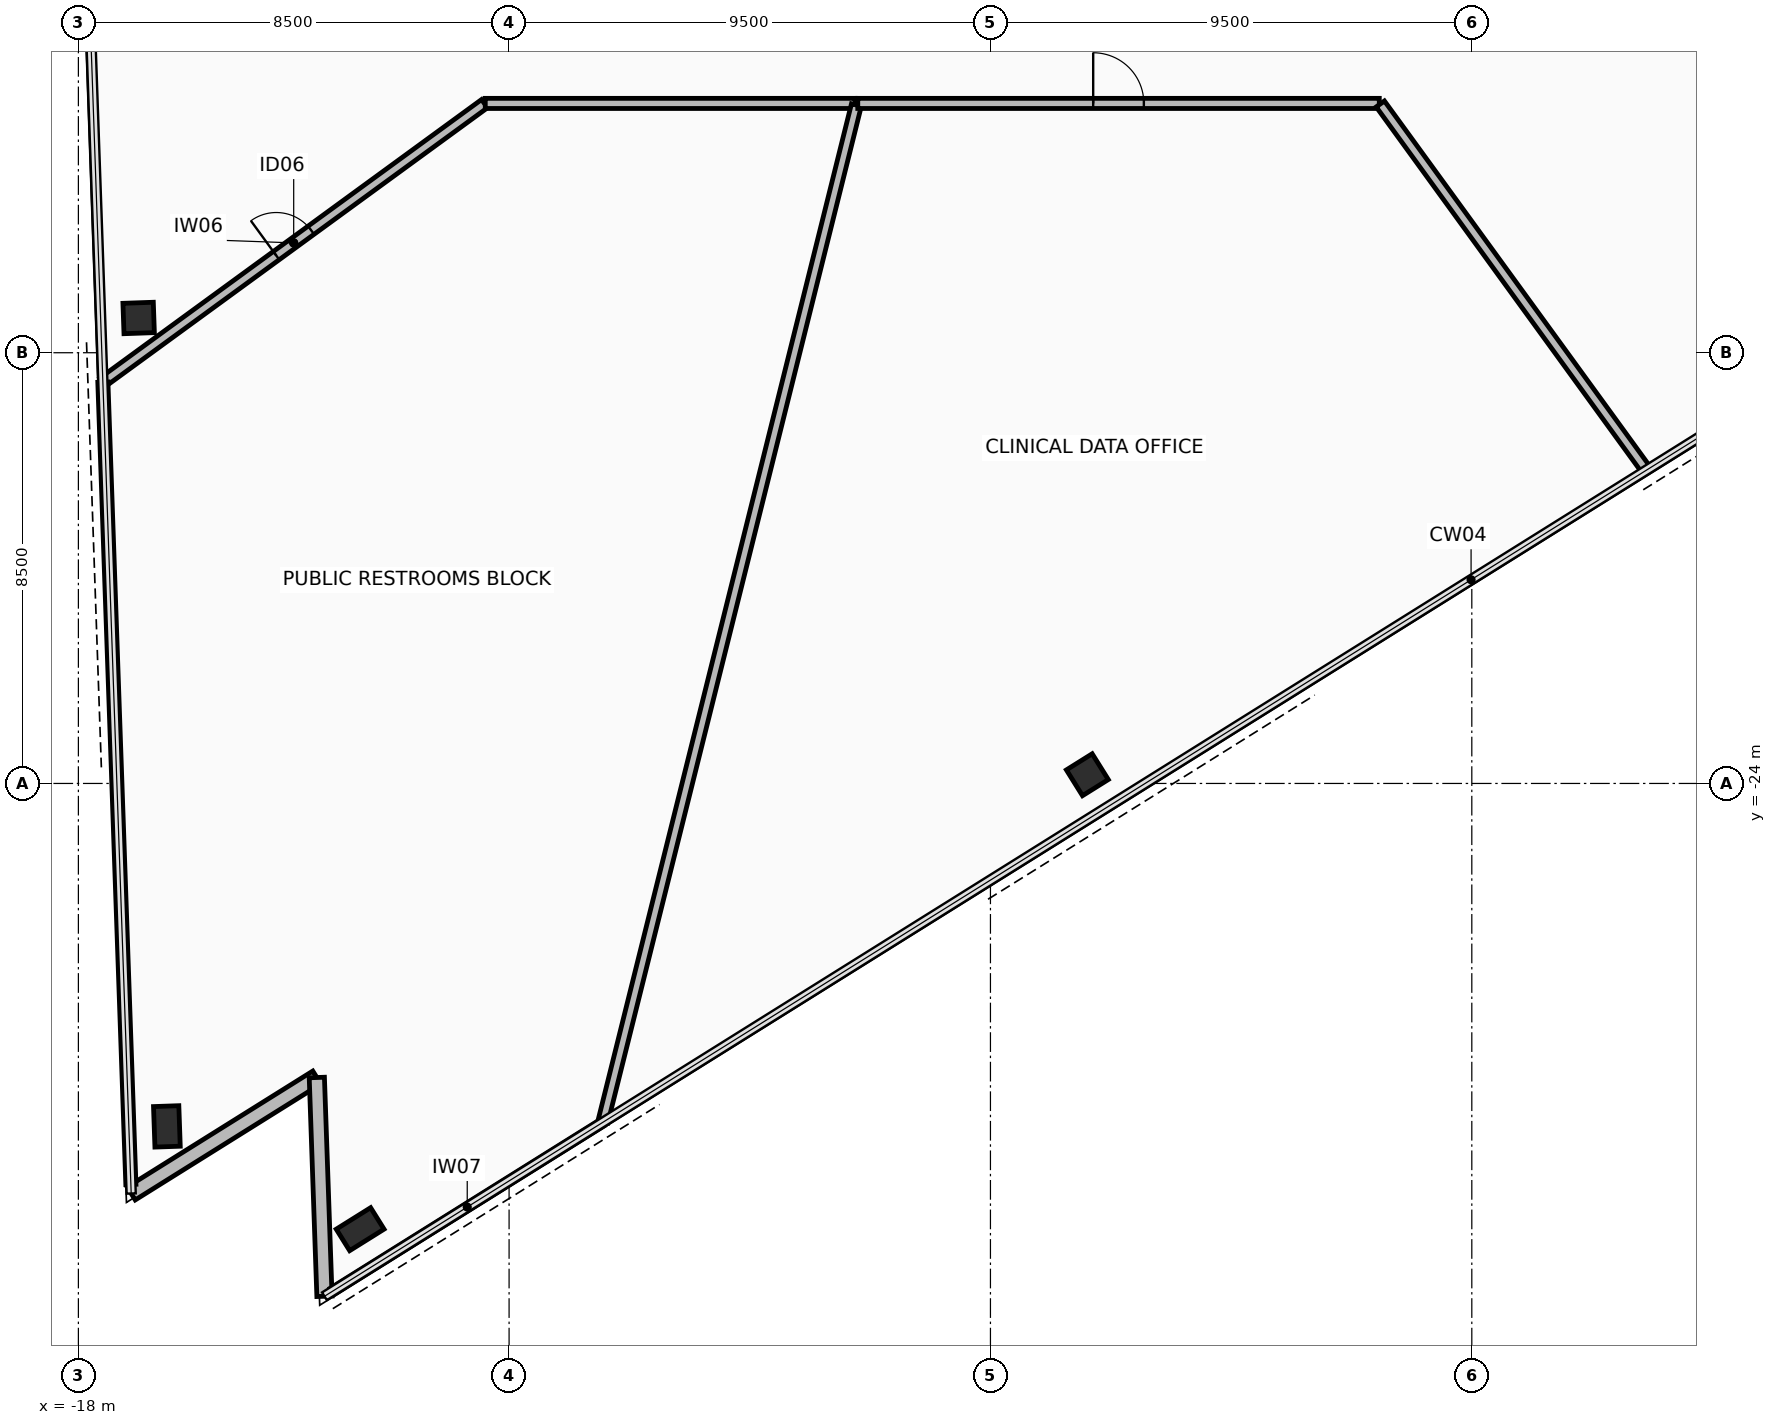
"""IFC4 building model, lengths in metres.
Left out: names, types, materials, properties, quantities, classifications, styles, units other than length and angle.
Written with IfcOpenShell. Run it as: python <this file> out.ifc"""

import sys

from ifc_helpers import new_model, si_unit, direction, frame, frame_2d, origin, origin_2d, place, context, subcontext, project, spatial, rectangle, hollow_rectangle, extrude, element, fill, save


model = new_model("IFC4")
c1 = context("Model", 3, precision=1e-05, world=origin(), true_north=direction((0.0, 1.0)))
c2 = subcontext(c1, "Body", "Model", "MODEL_VIEW")
j1 = project(units=[si_unit("LENGTHUNIT", "METRE"), si_unit("PLANEANGLEUNIT", "RADIAN")], contexts=[c1])
p1 = place(None, origin())
s1 = spatial("IfcSite", under=j1, at=p1, CompositionType="ELEMENT")
p2 = place(p1, origin())
s2 = spatial("IfcBuilding", under=s1, at=p2, CompositionType="ELEMENT")
p3 = place(p2, frame((0.0, 0.0, 142.4)))
s3 = spatial("IfcBuildingStorey", under=s2, at=p3, CompositionType="ELEMENT", Elevation=142.4)
p4 = place(p3, frame((-16.811, -14.814, 0.0), z_axis=(0.0, 0.0, 1.0), x_axis=(-0.034899496703, 0.999390827019, 0.0)))
e1 = element("IfcColumn", 1, at=p4, inside=s3, PredefinedType="COLUMN", context=c2, shape_type="SweptSolid", body=[
    extrude(hollow_rectangle(XDim=0.6, YDim=0.6, WallThickness=0.036, at=origin_2d()), origin(), (0.0, 0.0, 1.0), 3.6),
])
for number, where, z_axis, x_axis in (
    (2, (-16.254, -30.768, 0.0), (0.0, 0.0, 1.0), (-0.035, 0.999, 0.0)),
    (3, (-12.439, -32.796, 0.0), (0.0, 0.0, 1.0), (0.848, 0.53, 0.0)),
):
    element("IfcColumn", number, at=place(p3, frame(where, z_axis=z_axis, x_axis=x_axis)), inside=s3, PredefinedType="COLUMN", context=c2, shape_type="SweptSolid", body=[
        extrude(hollow_rectangle(XDim=0.5, YDim=0.8, WallThickness=0.04, at=origin_2d()), origin(), (0.0, 0.0, 1.0), 3.6),
    ])
p5 = place(p3, frame((1.912, -23.828, 0.0), z_axis=(0.0, 0.0, 1.0), x_axis=(0.848047171272, 0.529920744356, 0.0)))
e4 = element("IfcColumn", 4, at=p5, inside=s3, PredefinedType="COLUMN", context=c2, shape_type="SweptSolid", body=[
    extrude(hollow_rectangle(XDim=0.6, YDim=0.6, WallThickness=0.036, at=origin_2d()), origin(), (0.0, 0.0, 1.0), 3.6),
])
p6 = place(p3, frame((-16.958, -32.092, 0.0), z_axis=(0.0, 0.0, 1.0), x_axis=(0.848068146975, 0.529887174866, 0.0)))
e5 = element("IfcWall", 5, at=p6, inside=s3, PredefinedType="STANDARD", context=c2, shape_type="SweptSolid", body=[
    extrude(rectangle(XDim=4.32, YDim=0.3, at=frame_2d((2.16, 0.0))), origin(), (0.0, 0.0, 1.0), 2.705),
])
p7 = place(p3, frame((-13.294, -29.803, 0.0), z_axis=(0.0, 0.0, 1.0), x_axis=(0.034869079132, -0.999391888761, 0.0)))
e6 = element("IfcWall", 6, at=p7, inside=s3, PredefinedType="STANDARD", context=c2, shape_type="SweptSolid", body=[
    extrude(rectangle(XDim=4.32, YDim=0.3, at=frame_2d((2.16, 0.0))), origin(), (0.0, 0.0, 1.0), 2.705),
])
p8 = place(p3, frame((-17.517, -16.08, 0.0), z_axis=(0.0, 0.0, 1.0), x_axis=(0.807836100195, 0.58940718966, 0.0)))
e7 = element("IfcWall", 7, at=p8, inside=s3, PredefinedType="PARTITIONING", context=c2, shape_type="SweptSolid", body=[
    extrude(rectangle(XDim=9.324, YDim=0.2, at=frame_2d((4.662, 0.0))), origin(), (0.0, 0.0, 1.0), 2.705),
])
p9 = place(p8, frame((4.237, 0.0, 0.0)))
e8 = element("IfcOpeningElement", 8, at=p9, cuts=e7, PredefinedType="OPENING", context=c2, shape_type="SweptSolid", body=[
    extrude(rectangle(XDim=0.85, YDim=2.1, at=frame_2d((0.425, 1.05))), frame((0.0, 0.11, 0.0), z_axis=(0.0, -1.0, 0.0), x_axis=(1.0, 0.0, 0.0)), (0.0, 0.0, 1.0), 0.22),
])
p10 = place(p3, frame((-9.97, -10.58, 0.0), z_axis=(0.0, 0.0, 1.0), x_axis=(1.0, 0.0, 0.0)))
e9 = element("IfcWall", 9, at=p10, inside=s3, PredefinedType="PARTITIONING", context=c2, shape_type="SweptSolid", body=[
    extrude(rectangle(XDim=7.3, YDim=0.2, at=frame_2d((3.65, 0.0))), origin(), (0.0, 0.0, 1.0), 2.855),
])
p11 = place(p3, frame((-2.646, -10.611, 0.0), z_axis=(0.0, 0.0, 1.0), x_axis=(-0.241932855274, -0.970292993656, 0.0)))
e10 = element("IfcWall", 10, at=p11, inside=s3, PredefinedType="PARTITIONING", context=c2, shape_type="SweptSolid", body=[
    extrude(rectangle(XDim=20.682, YDim=0.2, at=frame_2d((10.341, 0.0))), origin(), (0.0, 0.0, 1.0), 2.705),
])
p12 = place(p3, frame((-7.66, -30.694, 0.0), z_axis=(0.0, 0.0, 1.0), x_axis=(-0.848046297007, -0.529922143463, 0.0)))
e11 = element("IfcWall", 11, at=p12, inside=s3, PredefinedType="PARTITIONING", context=c2, shape_type="SweptSolid", body=[
    extrude(rectangle(XDim=6.287, YDim=0.15, at=frame_2d((3.144, 0.0))), origin(), (0.0, 0.0, 1.0), 3.41),
])
p13 = place(p3, frame((-16.964, -31.913, 0.0), z_axis=(0.0, 0.0, 1.0), x_axis=(-0.034889540938, 0.999391174632, 0.0)))
e12 = element("IfcWall", 12, at=p13, inside=s3, PredefinedType="PARTITIONING", context=c2, shape_type="SweptSolid", body=[
    extrude(rectangle(XDim=15.843, YDim=0.2, at=frame_2d((7.921, 0.0))), origin(), (0.0, 0.0, 1.0), 3.41),
])
p14 = place(p3, frame((20.03, -13.391, 0.0), z_axis=(0.0, 0.0, 1.0), x_axis=(-0.782379652936, 0.622801797261, 0.0)))
e13 = element("IfcWall", 13, at=p14, inside=s3, PredefinedType="PARTITIONING", context=c2, shape_type="SweptSolid", body=[
    extrude(rectangle(XDim=10.405, YDim=0.2, at=frame_2d((5.203, 0.0))), origin(), (0.0, 0.0, 1.0), 2.705),
])
p15 = place(p14, frame((4.777, 0.0, 0.0)))
e14 = element("IfcOpeningElement", 14, at=p15, cuts=e13, PredefinedType="OPENING", context=c2, shape_type="SweptSolid", body=[
    extrude(rectangle(XDim=0.85, YDim=2.1, at=frame_2d((0.425, 1.05))), frame((0.0, 0.11, 0.0), z_axis=(0.0, -1.0, 0.0), x_axis=(1.0, 0.0, 0.0)), (0.0, 0.0, 1.0), 0.22),
])
p16 = place(p3, frame((-2.618, -10.58, 0.0), z_axis=(0.0, 0.0, 1.0), x_axis=(1.0, 0.0, 0.0)))
e15 = element("IfcWall", 15, at=p16, inside=s3, PredefinedType="PARTITIONING", context=c2, shape_type="SweptSolid", body=[
    extrude(rectangle(XDim=10.292, YDim=0.2, at=frame_2d((5.146, 0.0))), origin(), (0.0, 0.0, 1.0), 2.855),
])
p17 = place(p16, frame((4.646, 0.0, 0.0)))
e16 = element("IfcOpeningElement", 16, at=p17, cuts=e15, PredefinedType="OPENING", context=c2, shape_type="SweptSolid", body=[
    extrude(rectangle(XDim=1.0, YDim=2.15, at=frame_2d((0.5, 1.075))), frame((0.0, 0.11, 0.0), z_axis=(0.0, -1.0, 0.0), x_axis=(1.0, 0.0, 0.0)), (0.0, 0.0, 1.0), 0.22),
])
p18 = place(p3, frame((7.694, -10.59, 0.0), z_axis=(0.0, 0.0, 1.0), x_axis=(0.587773963439, -0.809025196086, 0.0)))
e17 = element("IfcWall", 17, at=p18, inside=s3, PredefinedType="PARTITIONING", context=c2, shape_type="SweptSolid", body=[
    extrude(rectangle(XDim=8.907, YDim=0.2, at=frame_2d((4.454, 0.0))), origin(), (0.0, 0.0, 1.0), 2.705),
])
p19 = place(p9, origin())
e18 = element("IfcDoor", 18, at=p19, inside=s3, OperationType="SINGLE_SWING_RIGHT", PredefinedType="DOOR", context=c2, shape_type="SweptSolid", body=[
    extrude(rectangle(XDim=0.85, YDim=2.1, at=frame_2d((0.425, 1.05))), frame((0.0, 0.025, 0.0), z_axis=(0.0, -1.0, 0.0), x_axis=(1.0, 0.0, 0.0)), (0.0, 0.0, 1.0), 0.05),
])
fill(e8, e18)
p20 = place(p17, origin())
e19 = element("IfcDoor", 19, at=p20, inside=s3, OperationType="SINGLE_SWING_RIGHT", PredefinedType="DOOR", context=c2, shape_type="SweptSolid", body=[
    extrude(rectangle(XDim=1.0, YDim=2.15, at=frame_2d((0.5, 1.075))), frame((0.0, 0.025, 0.0), z_axis=(0.0, -1.0, 0.0), x_axis=(1.0, 0.0, 0.0)), (0.0, 0.0, 1.0), 0.05),
])
fill(e16, e19)
save(model, sys.argv[1])
